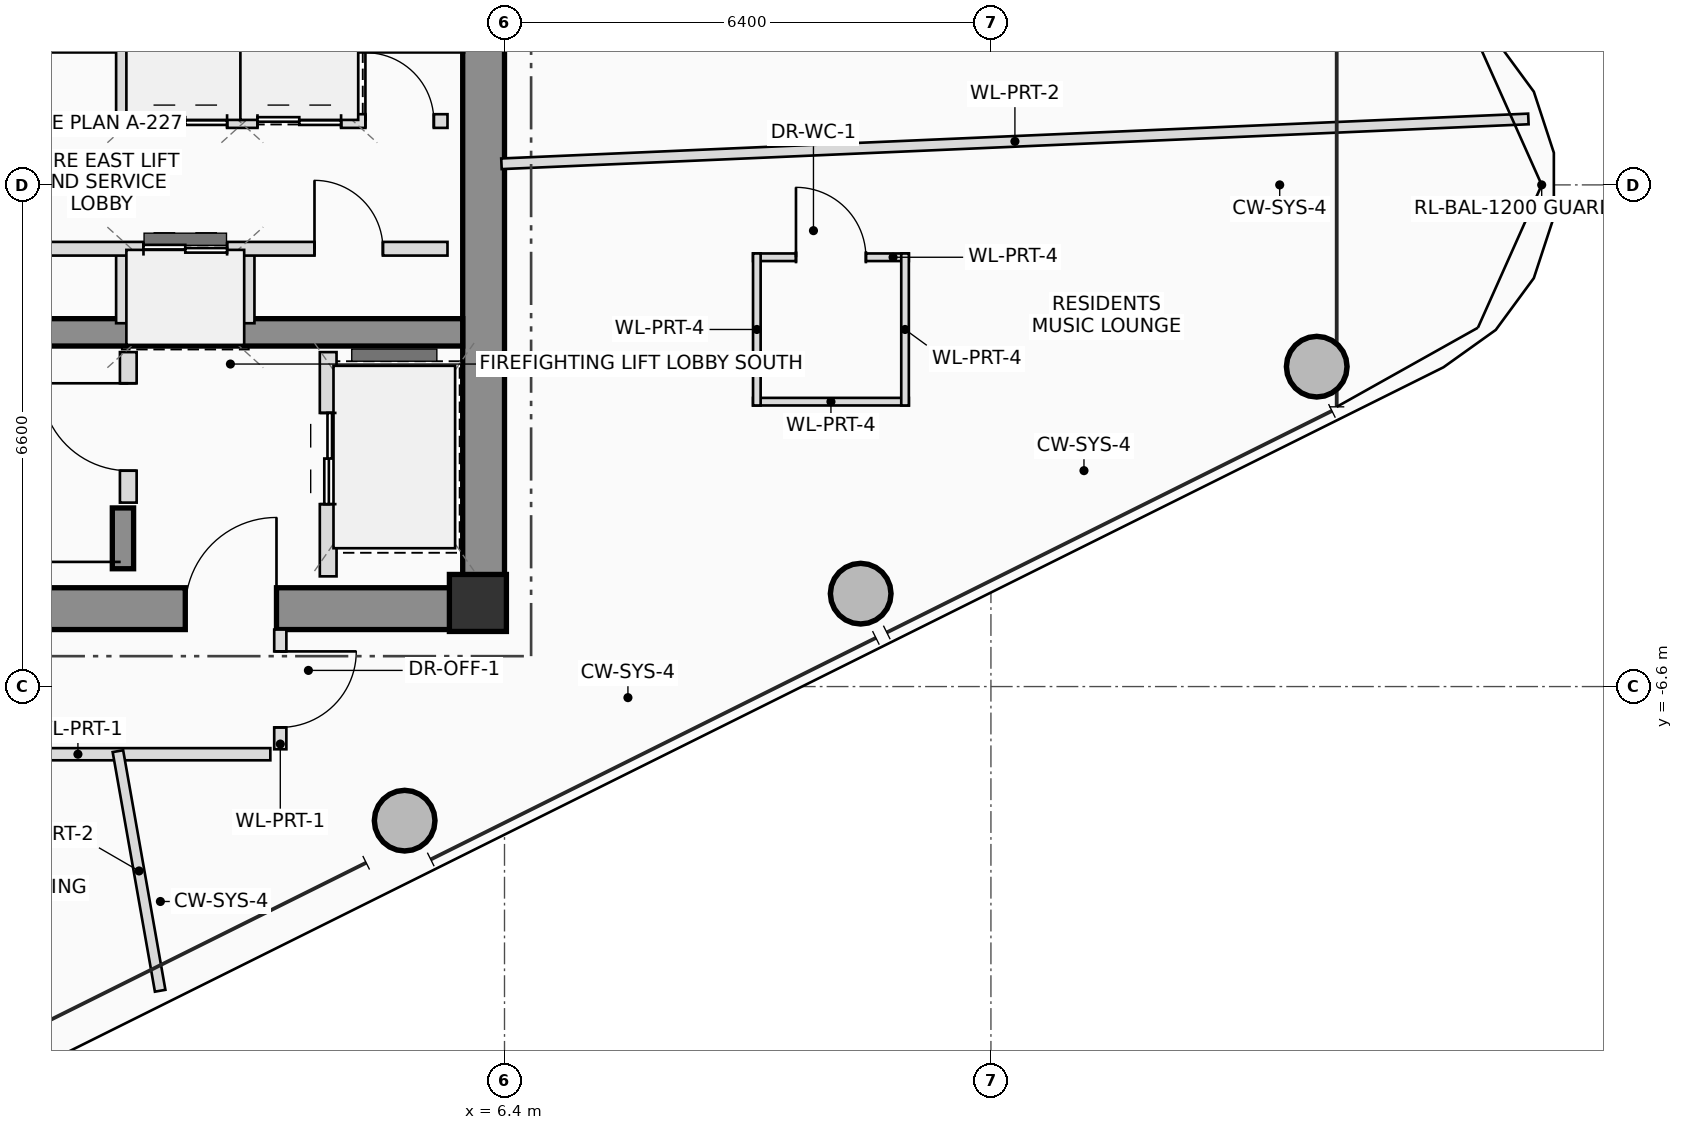
"""IFC4 building model, lengths in metres.
Left out: names, types, materials, properties, quantities, classifications, styles, units other than length and angle.
Written with IfcOpenShell. Run it as: python <this file> out.ifc"""

import sys

from ifc_helpers import new_model, si_unit, direction, frame, frame_2d, origin, origin_2d, place, context, subcontext, project, spatial, rectangle, hollow_circle, extrude, source, transform, mapped, element, fill, save


model = new_model("IFC4")
c1 = context("Model", 3, precision=1e-05, world=origin(), true_north=direction((0.0, 1.0)))
c2 = subcontext(c1, "Body", "Model", "MODEL_VIEW")
j1 = project(units=[si_unit("LENGTHUNIT", "METRE"), si_unit("PLANEANGLEUNIT", "RADIAN")], contexts=[c1])
p1 = place(None, origin())
s1 = spatial("IfcSite", under=j1, at=p1, CompositionType="ELEMENT")
p2 = place(p1, origin())
s2 = spatial("IfcBuilding", under=s1, at=p2, CompositionType="ELEMENT")
p3 = place(p2, frame((0.0, 0.0, 303.65)))
s3 = spatial("IfcBuildingStorey", under=s2, at=p3, CompositionType="ELEMENT", Elevation=303.65)
m1 = source(origin(), c2, "Body", "SweptSolid", [
    extrude(rectangle(XDim=0.75, YDim=0.75, at=origin_2d()), origin(), (0.0, 0.0, 1.0), 3.45),
])
p4 = place(p3, frame((6.05, -5.5, 0.0), z_axis=(0.0, 0.0, 1.0), x_axis=(1.0, 0.0, 0.0)))
e1 = element("IfcColumn", 1, at=p4, inside=s3, PredefinedType="COLUMN", context=c2, shape_type="MappedRepresentation", body=[
    mapped(m1, transform((0.0, 0.0, 0.0), scale=1.0)),
])
p5 = place(p3, frame((-6.4, -5.575, 0.0), z_axis=(0.0, 0.0, 1.0), x_axis=(1.0, 0.0, 0.0)))
e2 = element("IfcWall", 2, at=p5, inside=s3, PredefinedType="SHEAR", context=c2, shape_type="SweptSolid", body=[
    extrude(rectangle(XDim=12.8, YDim=0.55, at=frame_2d((6.4, 0.0))), origin(), (0.0, 0.0, 1.0), 3.45),
])
p6 = place(p5, frame((8.6, 0.0, 0.0)))
e3 = element("IfcOpeningElement", 3, at=p6, cuts=e2, PredefinedType="OPENING", context=c2, shape_type="SweptSolid", body=[
    extrude(rectangle(XDim=1.2, YDim=2.2, at=frame_2d((0.6, 1.1))), frame((0.0, 0.285, 0.0), z_axis=(0.0, -1.0, 0.0), x_axis=(1.0, 0.0, 0.0)), (0.0, 0.0, 1.0), 0.57),
])
p7 = place(p3, frame((6.125, -5.3, 0.0), z_axis=(0.0, 0.0, 1.0), x_axis=(0.0, 1.0, 0.0)))
e4 = element("IfcWall", 4, at=p7, inside=s3, PredefinedType="SHEAR", context=c2, shape_type="SweptSolid", body=[
    extrude(rectangle(XDim=10.6, YDim=0.55, at=frame_2d((5.3, 0.0))), origin(), (0.0, 0.0, 1.0), 3.45),
])
p8 = place(p3, frame((-5.85, -1.94, 0.0), z_axis=(0.0, 0.0, 1.0), x_axis=(1.0, 0.0, 0.0)))
e5 = element("IfcWall", 5, at=p8, inside=s3, PredefinedType="SHEAR", context=c2, shape_type="SweptSolid", body=[
    extrude(rectangle(XDim=11.7, YDim=0.36, at=frame_2d((5.85, 0.0))), origin(), (0.0, 0.0, 1.0), 3.45),
])
p9 = place(p3, frame((1.38, -5.05, 0.0), z_axis=(0.0, 0.0, 1.0), x_axis=(0.0, 1.0, 0.0)))
e6 = element("IfcWall", 6, at=p9, inside=s3, PredefinedType="SHEAR", context=c2, shape_type="SweptSolid", body=[
    extrude(rectangle(XDim=0.8, YDim=0.28, at=frame_2d((0.4, 0.0))), origin(), (0.0, 0.0, 1.0), 3.45),
])
m2 = source(origin(), c2, "Body", "SweptSolid", [
    extrude(hollow_circle(Radius=0.4, WallThickness=0.028, at=origin_2d()), origin(), (0.0, 0.0, 1.0), 3.45),
])
for number, where, z_axis, x_axis in (
    (7, (5.086, -8.364, 0.0), (0.0, 0.0, 1.0), (1.0, 0.0, 0.0)),
    (8, (11.086, -5.378, 0.0), (0.0, 0.0, 1.0), (1.0, 0.0, 0.0)),
    (9, (17.087, -2.392, 0.0), (0.0, 0.0, 1.0), (1.0, 0.0, 0.0)),
):
    element("IfcColumn", number, at=place(p3, frame(where, z_axis=z_axis, x_axis=x_axis)), inside=s3, PredefinedType="COLUMN", context=c2, shape_type="MappedRepresentation", body=[
        mapped(m2, transform((0.0, 0.0, 0.0), scale=1.0)),
    ])
p10 = place(p3, frame((1.45, -4.18, 0.0), z_axis=(0.0, 0.0, 1.0), x_axis=(0.0, 1.0, 0.0)))
e10 = element("IfcWall", 10, at=p10, inside=s3, PredefinedType="PLUMBINGWALL", context=c2, shape_type="SweptSolid", body=[
    extrude(rectangle(XDim=1.98, YDim=0.22, at=frame_2d((0.99, 0.0))), origin(), (0.0, 0.0, 1.0), 3.25),
])
p11 = place(p10, frame((0.42, 0.0, 0.0)))
e11 = element("IfcOpeningElement", 11, at=p11, cuts=e10, PredefinedType="OPENING", context=c2, shape_type="SweptSolid", body=[
    extrude(rectangle(XDim=1.15, YDim=2.15, at=frame_2d((0.575, 1.075))), frame((0.0, 0.12, 0.0), z_axis=(0.0, -1.0, 0.0), x_axis=(1.0, 0.0, 0.0)), (0.0, 0.0, 1.0), 0.24),
])
p12 = place(p3, frame((4.08, -5.15, 0.0), z_axis=(0.0, 0.0, 1.0), x_axis=(0.0, 1.0, 0.0)))
e12 = element("IfcWall", 12, at=p12, inside=s3, PredefinedType="PLUMBINGWALL", context=c2, shape_type="SweptSolid", body=[
    extrude(rectangle(XDim=2.95, YDim=0.22, at=frame_2d((1.475, 0.0))), origin(), (0.0, 0.0, 1.0), 3.25),
])
p13 = place(p12, frame((0.95, 0.0, 0.0)))
e13 = element("IfcOpeningElement", 13, at=p13, cuts=e12, PredefinedType="OPENING", context=c2, shape_type="SweptSolid", body=[
    extrude(rectangle(XDim=1.2, YDim=2.25, at=frame_2d((0.6, 1.125))), frame((0.0, 0.12, 0.0), z_axis=(0.0, -1.0, 0.0), x_axis=(1.0, 0.0, 0.0)), (0.0, 0.0, 1.0), 0.24),
])
for number, where, z_axis, x_axis in (
    (14, (1.38, 0.84, 0.0), (0.0, 0.0, 1.0), (0.0, 1.0, 0.0)),
    (15, (1.38, -1.82, 0.0), (0.0, 0.0, 1.0), (0.0, 1.0, 0.0)),
    (16, (3.02, 0.84, 0.0), (0.0, 0.0, 1.0), (0.0, 1.0, 0.0)),
    (17, (4.38, 0.84, 0.0), (0.0, 0.0, 1.0), (0.0, 1.0, 0.0)),
    (18, (3.02, -1.82, 0.0), (0.0, 0.0, 1.0), (0.0, 1.0, 0.0)),
):
    element("IfcWall", number, at=place(p3, frame(where, z_axis=z_axis, x_axis=x_axis)), inside=s3, PredefinedType="PLUMBINGWALL", context=c2, shape_type="SweptSolid", body=[
        extrude(rectangle(XDim=0.98, YDim=0.18, at=frame_2d((0.49, 0.0))), origin(), (0.0, 0.0, 1.0), 3.25),
    ])
p14 = place(p3, frame((-5.68, 0.84, 0.0), z_axis=(0.0, 0.0, 1.0), x_axis=(1.0, 0.0, 0.0)))
e19 = element("IfcWall", 19, at=p14, inside=s3, PredefinedType="PLUMBINGWALL", context=c2, shape_type="SweptSolid", body=[
    extrude(rectangle(XDim=11.33, YDim=0.18, at=frame_2d((5.665, 0.0))), origin(), (0.0, 0.0, 1.0), 3.25),
])
p15 = place(p14, frame((3.13, 0.0, 0.0)))
e20 = element("IfcOpeningElement", 20, at=p15, cuts=e19, PredefinedType="OPENING", context=c2, shape_type="SweptSolid", body=[
    extrude(rectangle(XDim=0.9, YDim=2.05, at=frame_2d((0.45, 1.025))), frame((0.0, 0.1, 0.0), z_axis=(0.0, -1.0, 0.0), x_axis=(1.0, 0.0, 0.0)), (0.0, 0.0, 1.0), 0.2),
])
p16 = place(p14, frame((7.33, 0.0, 0.0)))
e21 = element("IfcOpeningElement", 21, at=p16, cuts=e19, PredefinedType="OPENING", context=c2, shape_type="SweptSolid", body=[
    extrude(rectangle(XDim=1.1, YDim=2.2, at=frame_2d((0.55, 1.1))), frame((0.0, 0.1, 0.0), z_axis=(0.0, -1.0, 0.0), x_axis=(1.0, 0.0, 0.0)), (0.0, 0.0, 1.0), 0.2),
])
p17 = place(p14, frame((8.83, 0.0, 0.0)))
e22 = element("IfcOpeningElement", 22, at=p17, cuts=e19, PredefinedType="OPENING", context=c2, shape_type="SweptSolid", body=[
    extrude(rectangle(XDim=1.1, YDim=2.2, at=frame_2d((0.55, 1.1))), frame((0.0, 0.1, 0.0), z_axis=(0.0, -1.0, 0.0), x_axis=(1.0, 0.0, 0.0)), (0.0, 0.0, 1.0), 0.2),
])
p18 = place(p14, frame((10.25, 0.0, 0.0)))
e23 = element("IfcOpeningElement", 23, at=p18, cuts=e19, PredefinedType="OPENING", context=c2, shape_type="SweptSolid", body=[
    extrude(rectangle(XDim=0.9, YDim=2.05, at=frame_2d((0.45, 1.025))), frame((0.0, 0.1, 0.0), z_axis=(0.0, -1.0, 0.0), x_axis=(1.0, 0.0, 0.0)), (0.0, 0.0, 1.0), 0.2),
])
p19 = place(p3, frame((-5.68, -0.84, 0.0), z_axis=(0.0, 0.0, 1.0), x_axis=(1.0, 0.0, 0.0)))
e24 = element("IfcWall", 24, at=p19, inside=s3, PredefinedType="PLUMBINGWALL", context=c2, shape_type="SweptSolid", body=[
    extrude(rectangle(XDim=11.33, YDim=0.18, at=frame_2d((5.665, 0.0))), origin(), (0.0, 0.0, 1.0), 3.25),
])
p20 = place(p19, frame((3.13, 0.0, 0.0)))
e25 = element("IfcOpeningElement", 25, at=p20, cuts=e24, PredefinedType="OPENING", context=c2, shape_type="SweptSolid", body=[
    extrude(rectangle(XDim=0.9, YDim=2.05, at=frame_2d((0.45, 1.025))), frame((0.0, 0.1, 0.0), z_axis=(0.0, -1.0, 0.0), x_axis=(1.0, 0.0, 0.0)), (0.0, 0.0, 1.0), 0.2),
])
p21 = place(p19, frame((7.33, 0.0, 0.0)))
e26 = element("IfcOpeningElement", 26, at=p21, cuts=e24, PredefinedType="OPENING", context=c2, shape_type="SweptSolid", body=[
    extrude(rectangle(XDim=1.1, YDim=2.2, at=frame_2d((0.55, 1.1))), frame((0.0, 0.1, 0.0), z_axis=(0.0, -1.0, 0.0), x_axis=(1.0, 0.0, 0.0)), (0.0, 0.0, 1.0), 0.2),
])
p22 = place(p19, frame((9.58, 0.0, 0.0)))
e27 = element("IfcOpeningElement", 27, at=p22, cuts=e24, PredefinedType="OPENING", context=c2, shape_type="SweptSolid", body=[
    extrude(rectangle(XDim=0.9, YDim=2.05, at=frame_2d((0.45, 1.025))), frame((0.0, 0.1, 0.0), z_axis=(0.0, -1.0, 0.0), x_axis=(1.0, 0.0, 0.0)), (0.0, 0.0, 1.0), 0.2),
])
p23 = place(p3, frame((9.67, -0.952, 0.0), z_axis=(0.0, 0.0, 1.0), x_axis=(1.0, 0.0, 0.0)))
e28 = element("IfcWall", 28, at=p23, inside=s3, PredefinedType="PARTITIONING", context=c2, shape_type="SweptSolid", body=[
    extrude(rectangle(XDim=2.05, YDim=0.1, at=frame_2d((1.025, 0.0))), origin(), (0.0, 0.0, 1.0), 2.905),
])
p24 = place(p23, frame((0.565, 0.0, 0.0)))
e29 = element("IfcOpeningElement", 29, at=p24, cuts=e28, PredefinedType="OPENING", context=c2, shape_type="SweptSolid", body=[
    extrude(rectangle(XDim=0.92, YDim=2.1, at=frame_2d((0.46, 1.05))), frame((0.0, 0.06, 0.0), z_axis=(0.0, -1.0, 0.0), x_axis=(1.0, 0.0, 0.0)), (0.0, 0.0, 1.0), 0.12),
])
p25 = place(p3, frame((11.72, -2.852, 0.0), z_axis=(0.0, 0.0, 1.0), x_axis=(-1.0, 0.0, 0.0)))
e30 = element("IfcWall", 30, at=p25, inside=s3, PredefinedType="PARTITIONING", context=c2, shape_type="SweptSolid", body=[
    extrude(rectangle(XDim=2.05, YDim=0.1, at=frame_2d((1.025, 0.0))), origin(), (0.0, 0.0, 1.0), 2.905),
])
for number, where, z_axis, x_axis in (
    (31, (11.67, -0.902, 0.0), (0.0, 0.0, 1.0), (0.0, -1.0, 0.0)),
    (32, (9.72, -2.902, 0.0), (0.0, 0.0, 1.0), (0.0, 1.0, 0.0)),
):
    element("IfcWall", number, at=place(p3, frame(where, z_axis=z_axis, x_axis=x_axis)), inside=s3, PredefinedType="PARTITIONING", context=c2, shape_type="SweptSolid", body=[
        extrude(rectangle(XDim=2.0, YDim=0.1, at=frame_2d((1.0, 0.0))), origin(), (0.0, 0.0, 1.0), 3.25),
    ])
p26 = place(p3, frame((3.45, -5.85, 0.0), z_axis=(0.0, 0.0, 1.0), x_axis=(0.0, -1.0, 0.0)))
e33 = element("IfcWall", 33, at=p26, inside=s3, PredefinedType="PARTITIONING", context=c2, shape_type="SweptSolid", body=[
    extrude(rectangle(XDim=1.575, YDim=0.16, at=frame_2d((0.787, 0.0))), origin(), (0.0, 0.0, 1.0), 2.855),
])
p27 = place(p26, frame((0.287, 0.0, 0.0)))
e34 = element("IfcOpeningElement", 34, at=p27, cuts=e33, PredefinedType="OPENING", context=c2, shape_type="SweptSolid", body=[
    extrude(rectangle(XDim=1.0, YDim=2.25, at=frame_2d((0.5, 1.125))), frame((0.0, 0.09, 0.0), z_axis=(0.0, -1.0, 0.0), x_axis=(1.0, 0.0, 0.0)), (0.0, 0.0, 1.0), 0.18),
])
p28 = place(p3, frame((3.319, -7.49, 0.0), z_axis=(0.0, 0.0, 1.0), x_axis=(-1.0, 0.0, 0.0)))
e35 = element("IfcWall", 35, at=p28, inside=s3, PredefinedType="PARTITIONING", context=c2, shape_type="SweptSolid", body=[
    extrude(rectangle(XDim=9.679, YDim=0.16, at=frame_2d((4.84, 0.0))), origin(), (0.0, 0.0, 1.0), 2.655),
])
p29 = place(p28, frame((5.213, 0.0, 0.0)))
e36 = element("IfcOpeningElement", 36, at=p29, cuts=e35, PredefinedType="OPENING", context=c2, shape_type="SweptSolid", body=[
    extrude(rectangle(XDim=1.05, YDim=2.2, at=frame_2d((0.525, 1.1))), frame((0.0, 0.09, 0.0), z_axis=(0.0, -1.0, 0.0), x_axis=(1.0, 0.0, 0.0)), (0.0, 0.0, 1.0), 0.18),
])
p30 = place(p3, frame((6.36, 0.278, 0.0), z_axis=(0.0, 0.0, 1.0), x_axis=(0.999047623791, 0.043633076864, 0.0)))
e37 = element("IfcWall", 37, at=p30, inside=s3, PredefinedType="PARTITIONING", context=c2, shape_type="SweptSolid", body=[
    extrude(rectangle(XDim=13.524, YDim=0.14, at=frame_2d((6.762, 0.0))), origin(), (0.0, 0.0, 1.0), 2.815),
])
p31 = place(p3, frame((1.314, -7.45, 0.0), z_axis=(0.0, 0.0, 1.0), x_axis=(0.173619966433, -0.984812726997, 0.0)))
e38 = element("IfcWall", 38, at=p31, inside=s3, PredefinedType="PARTITIONING", context=c2, shape_type="SweptSolid", body=[
    extrude(rectangle(XDim=3.2, YDim=0.14, at=frame_2d((1.6, 0.0))), origin(), (0.0, 0.0, 1.0), 2.815),
])
p32 = place(p6, origin())
e39 = element("IfcDoor", 39, at=p32, inside=s3, OperationType="SINGLE_SWING_RIGHT", PredefinedType="DOOR", context=c2, shape_type="SweptSolid", body=[
    extrude(rectangle(XDim=1.2, YDim=2.2, at=frame_2d((0.6, 1.1))), frame((0.0, 0.025, 0.0), z_axis=(0.0, -1.0, 0.0), x_axis=(1.0, 0.0, 0.0)), (0.0, 0.0, 1.0), 0.05),
])
fill(e3, e39)
p33 = place(p11, origin())
e40 = element("IfcDoor", 40, at=p33, inside=s3, OperationType="SINGLE_SWING_RIGHT", PredefinedType="DOOR", context=c2, shape_type="SweptSolid", body=[
    extrude(rectangle(XDim=1.15, YDim=2.15, at=frame_2d((0.575, 1.075))), frame((0.0, 0.025, 0.0), z_axis=(0.0, -1.0, 0.0), x_axis=(1.0, 0.0, 0.0)), (0.0, 0.0, 1.0), 0.05),
])
fill(e11, e40)
p34 = place(p13, origin())
e41 = element("IfcDoor", 41, at=p34, inside=s3, OperationType="DOUBLE_DOOR_SLIDING", PredefinedType="DOOR", context=c2, shape_type="SweptSolid", body=[
    extrude(rectangle(XDim=1.2, YDim=2.25, at=frame_2d((0.6, 1.125))), frame((0.0, 0.025, 0.0), z_axis=(0.0, -1.0, 0.0), x_axis=(1.0, 0.0, 0.0)), (0.0, 0.0, 1.0), 0.05),
])
fill(e13, e41)
p35 = place(p16, origin())
e42 = element("IfcDoor", 42, at=p35, inside=s3, OperationType="DOUBLE_DOOR_SLIDING", PredefinedType="DOOR", context=c2, shape_type="SweptSolid", body=[
    extrude(rectangle(XDim=1.1, YDim=2.2, at=frame_2d((0.55, 1.1))), frame((0.0, 0.025, 0.0), z_axis=(0.0, -1.0, 0.0), x_axis=(1.0, 0.0, 0.0)), (0.0, 0.0, 1.0), 0.05),
])
fill(e21, e42)
p36 = place(p17, origin())
e43 = element("IfcDoor", 43, at=p36, inside=s3, OperationType="DOUBLE_DOOR_SLIDING", PredefinedType="DOOR", context=c2, shape_type="SweptSolid", body=[
    extrude(rectangle(XDim=1.1, YDim=2.2, at=frame_2d((0.55, 1.1))), frame((0.0, 0.025, 0.0), z_axis=(0.0, -1.0, 0.0), x_axis=(1.0, 0.0, 0.0)), (0.0, 0.0, 1.0), 0.05),
])
fill(e22, e43)
p37 = place(p18, origin())
e44 = element("IfcDoor", 44, at=p37, inside=s3, OperationType="SINGLE_SWING_LEFT", PredefinedType="DOOR", context=c2, shape_type="SweptSolid", body=[
    extrude(rectangle(XDim=0.9, YDim=2.05, at=frame_2d((0.45, 1.025))), frame((0.0, 0.025, 0.0), z_axis=(0.0, -1.0, 0.0), x_axis=(1.0, 0.0, 0.0)), (0.0, 0.0, 1.0), 0.05),
])
fill(e23, e44)
p38 = place(p21, origin())
e45 = element("IfcDoor", 45, at=p38, inside=s3, OperationType="DOUBLE_DOOR_SLIDING", PredefinedType="DOOR", context=c2, shape_type="SweptSolid", body=[
    extrude(rectangle(XDim=1.1, YDim=2.2, at=frame_2d((0.55, 1.1))), frame((0.0, 0.025, 0.0), z_axis=(0.0, -1.0, 0.0), x_axis=(1.0, 0.0, 0.0)), (0.0, 0.0, 1.0), 0.05),
])
fill(e26, e45)
p39 = place(p22, origin())
e46 = element("IfcDoor", 46, at=p39, inside=s3, OperationType="SINGLE_SWING_LEFT", PredefinedType="DOOR", context=c2, shape_type="SweptSolid", body=[
    extrude(rectangle(XDim=0.9, YDim=2.05, at=frame_2d((0.45, 1.025))), frame((0.0, 0.025, 0.0), z_axis=(0.0, -1.0, 0.0), x_axis=(1.0, 0.0, 0.0)), (0.0, 0.0, 1.0), 0.05),
])
fill(e27, e46)
p40 = place(p24, origin())
e47 = element("IfcDoor", 47, at=p40, inside=s3, OperationType="SINGLE_SWING_LEFT", PredefinedType="DOOR", context=c2, shape_type="SweptSolid", body=[
    extrude(rectangle(XDim=0.92, YDim=2.1, at=frame_2d((0.46, 1.05))), frame((0.0, 0.025, 0.0), z_axis=(0.0, -1.0, 0.0), x_axis=(1.0, 0.0, 0.0)), (0.0, 0.0, 1.0), 0.05),
])
fill(e29, e47)
p41 = place(p27, origin())
e48 = element("IfcDoor", 48, at=p41, inside=s3, OperationType="SINGLE_SWING_LEFT", PredefinedType="DOOR", context=c2, shape_type="SweptSolid", body=[
    extrude(rectangle(XDim=1.0, YDim=2.25, at=frame_2d((0.5, 1.125))), frame((0.0, 0.025, 0.0), z_axis=(0.0, -1.0, 0.0), x_axis=(1.0, 0.0, 0.0)), (0.0, 0.0, 1.0), 0.05),
])
fill(e34, e48)
save(model, sys.argv[1])
